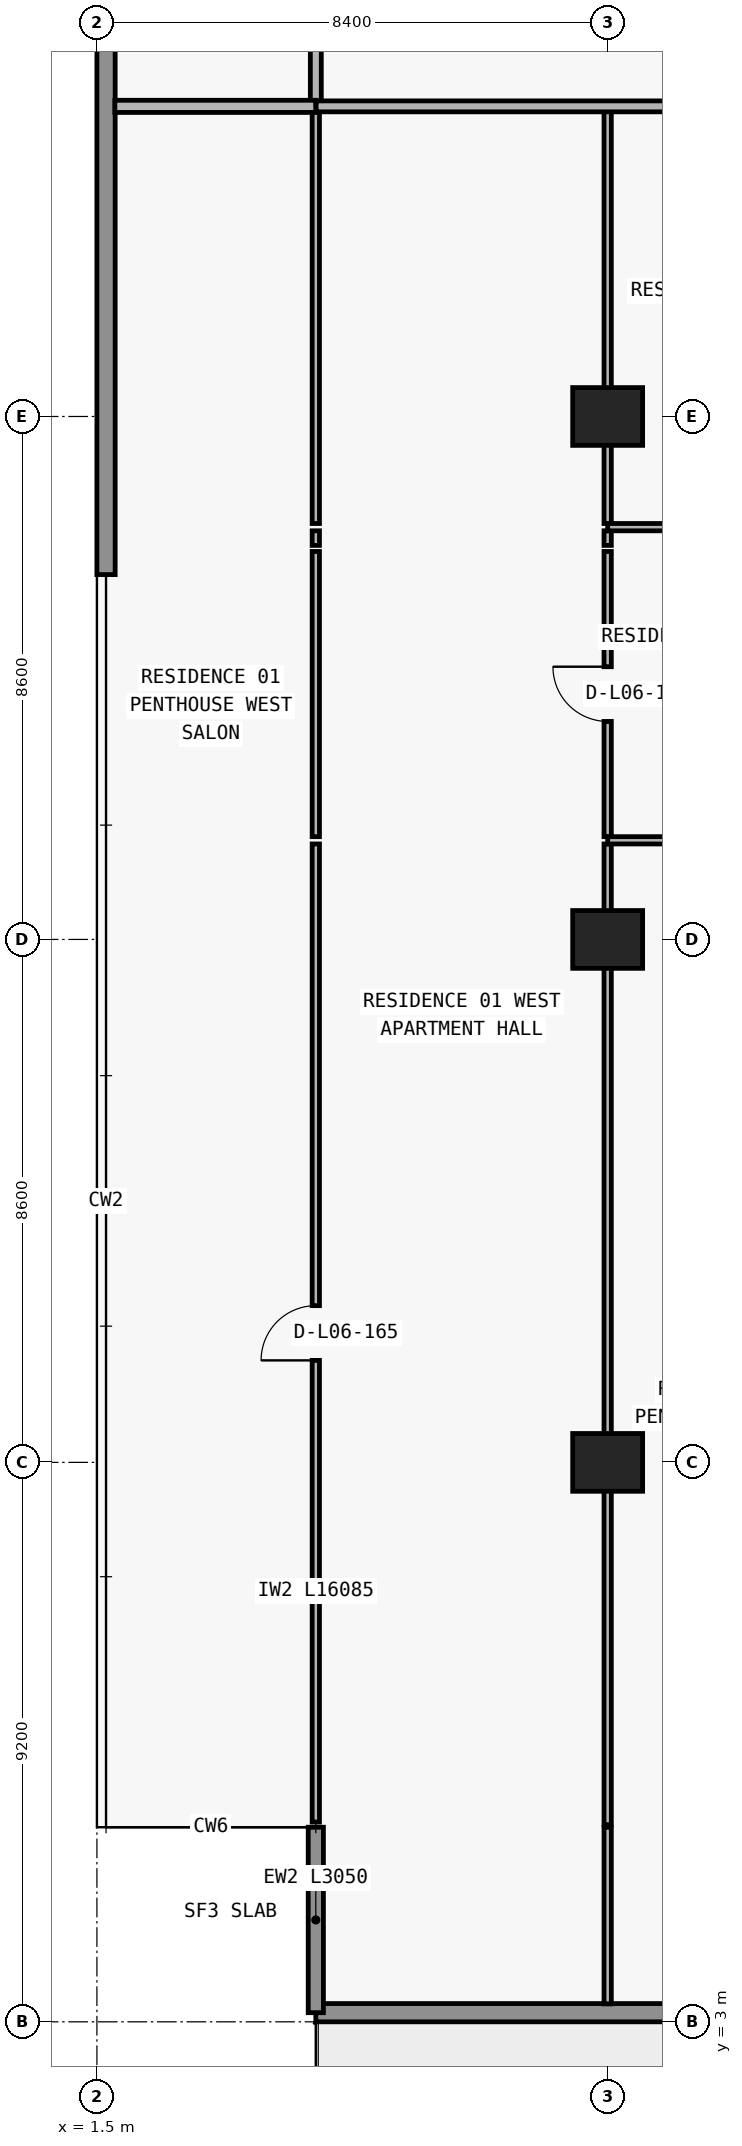
"""IFC4 building model, lengths in metres.
Left out: names, types, materials, properties, quantities, classifications, styles, units other than length and angle.
Written with IfcOpenShell. Run it as: python <this file> out.ifc"""

import sys

from ifc_helpers import new_model, si_unit, direction, frame, frame_2d, origin, origin_2d, place, context, subcontext, project, spatial, rectangle, extrude, element, fill, save


model = new_model("IFC4")
c1 = context("Model", 3, precision=1e-05, world=origin(), true_north=direction((0.0, 1.0)))
c2 = subcontext(c1, "Body", "Model", "MODEL_VIEW")
j1 = project(units=[si_unit("LENGTHUNIT", "METRE"), si_unit("PLANEANGLEUNIT", "RADIAN")], contexts=[c1])
p1 = place(None, origin())
s1 = spatial("IfcSite", under=j1, at=p1, CompositionType="ELEMENT")
p2 = place(p1, origin())
s2 = spatial("IfcBuilding", under=s1, at=p2, CompositionType="ELEMENT")
p3 = place(p2, frame((0.0, 0.0, 30.0)))
s3 = spatial("IfcBuildingStorey", under=s2, at=p3, CompositionType="ELEMENT", Elevation=30.0)
for number, where, z_axis, x_axis in (
    (1, (9.9, 12.2, 0.0), (0.0, 0.0, 1.0), (1.0, 0.0, 0.0)),
    (2, (9.9, 20.8, 0.0), (0.0, 0.0, 1.0), (1.0, 0.0, 0.0)),
    (3, (9.9, 29.4, 0.0), (0.0, 0.0, 1.0), (1.0, 0.0, 0.0)),
):
    element("IfcColumn", number, at=place(p3, frame(where, z_axis=z_axis, x_axis=x_axis)), inside=s3, PredefinedType="COLUMN", context=c2, shape_type="SweptSolid", body=[
        extrude(rectangle(XDim=1.15, YDim=0.95, at=origin_2d()), origin(), (0.0, 0.0, 1.0), 3.05),
    ])
p4 = place(p3, frame((72.7, 3.15, 0.0), z_axis=(0.0, 0.0, 1.0), x_axis=(-1.0, 0.0, 0.0)))
e4 = element("IfcWall", 4, at=p4, inside=s3, PredefinedType="STANDARD", context=c2, shape_type="SweptSolid", body=[
    extrude(rectangle(XDim=67.6, YDim=0.3, at=frame_2d((33.8, 0.0))), origin(), (0.0, 0.0, 1.0), 3.05),
])
p5 = place(p4, frame((59.826, 0.0, 0.0)))
e5 = element("IfcOpeningElement", 5, at=p5, cuts=e4, PredefinedType="OPENING", context=c2, shape_type="SweptSolid", body=[
    extrude(rectangle(XDim=2.0, YDim=2.3, at=frame_2d((1.0, 1.15))), frame((0.0, 0.16, 0.0), z_axis=(0.0, -1.0, 0.0), x_axis=(1.0, 0.0, 0.0)), (0.0, 0.0, 1.0), 0.32),
])
p6 = place(p4, frame((55.526, 0.0, 0.85)))
e6 = element("IfcOpeningElement", 6, at=p6, cuts=e4, PredefinedType="OPENING", context=c2, shape_type="SweptSolid", body=[
    extrude(rectangle(XDim=2.2, YDim=1.55, at=frame_2d((1.1, 0.775))), frame((0.0, 0.16, 0.0), z_axis=(0.0, -1.0, 0.0), x_axis=(1.0, 0.0, 0.0)), (0.0, 0.0, 1.0), 0.32),
])
p7 = place(p4, frame((51.09, 0.0, 0.0)))
e7 = element("IfcOpeningElement", 7, at=p7, cuts=e4, PredefinedType="OPENING", context=c2, shape_type="SweptSolid", body=[
    extrude(rectangle(XDim=2.0, YDim=2.3, at=frame_2d((1.0, 1.15))), frame((0.0, 0.16, 0.0), z_axis=(0.0, -1.0, 0.0), x_axis=(1.0, 0.0, 0.0)), (0.0, 0.0, 1.0), 0.32),
])
p8 = place(p4, frame((46.99, 0.0, 0.85)))
e8 = element("IfcOpeningElement", 8, at=p8, cuts=e4, PredefinedType="OPENING", context=c2, shape_type="SweptSolid", body=[
    extrude(rectangle(XDim=1.8, YDim=1.55, at=frame_2d((0.9, 0.775))), frame((0.0, 0.16, 0.0), z_axis=(0.0, -1.0, 0.0), x_axis=(1.0, 0.0, 0.0)), (0.0, 0.0, 1.0), 0.32),
])
p9 = place(p4, frame((43.026, 0.0, 0.0)))
e9 = element("IfcOpeningElement", 9, at=p9, cuts=e4, PredefinedType="OPENING", context=c2, shape_type="SweptSolid", body=[
    extrude(rectangle(XDim=2.0, YDim=2.3, at=frame_2d((1.0, 1.15))), frame((0.0, 0.16, 0.0), z_axis=(0.0, -1.0, 0.0), x_axis=(1.0, 0.0, 0.0)), (0.0, 0.0, 1.0), 0.32),
])
p10 = place(p4, frame((38.726, 0.0, 0.85)))
e10 = element("IfcOpeningElement", 10, at=p10, cuts=e4, PredefinedType="OPENING", context=c2, shape_type="SweptSolid", body=[
    extrude(rectangle(XDim=2.2, YDim=1.55, at=frame_2d((1.1, 0.775))), frame((0.0, 0.16, 0.0), z_axis=(0.0, -1.0, 0.0), x_axis=(1.0, 0.0, 0.0)), (0.0, 0.0, 1.0), 0.32),
])
p11 = place(p4, frame((34.69, 0.0, 0.0)))
e11 = element("IfcOpeningElement", 11, at=p11, cuts=e4, PredefinedType="OPENING", context=c2, shape_type="SweptSolid", body=[
    extrude(rectangle(XDim=2.0, YDim=2.3, at=frame_2d((1.0, 1.15))), frame((0.0, 0.16, 0.0), z_axis=(0.0, -1.0, 0.0), x_axis=(1.0, 0.0, 0.0)), (0.0, 0.0, 1.0), 0.32),
])
p12 = place(p4, frame((30.81, 0.0, 0.65)))
e12 = element("IfcOpeningElement", 12, at=p12, cuts=e4, PredefinedType="OPENING", context=c2, shape_type="SweptSolid", body=[
    extrude(rectangle(XDim=2.6, YDim=1.85, at=frame_2d((1.3, 0.925))), frame((0.0, 0.16, 0.0), z_axis=(0.0, -1.0, 0.0), x_axis=(1.0, 0.0, 0.0)), (0.0, 0.0, 1.0), 0.32),
])
p13 = place(p4, frame((24.7, 0.0, 0.85)))
e13 = element("IfcOpeningElement", 13, at=p13, cuts=e4, PredefinedType="OPENING", context=c2, shape_type="SweptSolid", body=[
    extrude(rectangle(XDim=2.2, YDim=1.55, at=frame_2d((1.1, 0.775))), frame((0.0, 0.16, 0.0), z_axis=(0.0, -1.0, 0.0), x_axis=(1.0, 0.0, 0.0)), (0.0, 0.0, 1.0), 0.32),
])
p14 = place(p4, frame((18.626, 0.0, 0.0)))
e14 = element("IfcOpeningElement", 14, at=p14, cuts=e4, PredefinedType="OPENING", context=c2, shape_type="SweptSolid", body=[
    extrude(rectangle(XDim=2.0, YDim=2.3, at=frame_2d((1.0, 1.15))), frame((0.0, 0.16, 0.0), z_axis=(0.0, -1.0, 0.0), x_axis=(1.0, 0.0, 0.0)), (0.0, 0.0, 1.0), 0.32),
])
p15 = place(p4, frame((14.326, 0.0, 0.85)))
e15 = element("IfcOpeningElement", 15, at=p15, cuts=e4, PredefinedType="OPENING", context=c2, shape_type="SweptSolid", body=[
    extrude(rectangle(XDim=2.2, YDim=1.55, at=frame_2d((1.1, 0.775))), frame((0.0, 0.16, 0.0), z_axis=(0.0, -1.0, 0.0), x_axis=(1.0, 0.0, 0.0)), (0.0, 0.0, 1.0), 0.32),
])
p16 = place(p4, frame((9.89, 0.0, 0.0)))
e16 = element("IfcOpeningElement", 16, at=p16, cuts=e4, PredefinedType="OPENING", context=c2, shape_type="SweptSolid", body=[
    extrude(rectangle(XDim=2.0, YDim=2.3, at=frame_2d((1.0, 1.15))), frame((0.0, 0.16, 0.0), z_axis=(0.0, -1.0, 0.0), x_axis=(1.0, 0.0, 0.0)), (0.0, 0.0, 1.0), 0.32),
])
p17 = place(p4, frame((5.79, 0.0, 0.85)))
e17 = element("IfcOpeningElement", 17, at=p17, cuts=e4, PredefinedType="OPENING", context=c2, shape_type="SweptSolid", body=[
    extrude(rectangle(XDim=1.8, YDim=1.55, at=frame_2d((0.9, 0.775))), frame((0.0, 0.16, 0.0), z_axis=(0.0, -1.0, 0.0), x_axis=(1.0, 0.0, 0.0)), (0.0, 0.0, 1.0), 0.32),
])
p18 = place(p3, frame((5.1, 6.2, 0.0), z_axis=(0.0, 0.0, 1.0), x_axis=(0.0, -1.0, 0.0)))
e18 = element("IfcWall", 18, at=p18, inside=s3, PredefinedType="ELEMENTEDWALL", context=c2, shape_type="SweptSolid", body=[
    extrude(rectangle(XDim=3.05, YDim=0.25, at=frame_2d((1.525, 0.0))), origin(), (0.0, 0.0, 1.0), 3.05),
])
p19 = place(p3, frame((1.65, 26.8, 0.0), z_axis=(0.0, 0.0, 1.0), x_axis=(0.0, 1.0, 0.0)))
e19 = element("IfcWall", 19, at=p19, inside=s3, PredefinedType="STANDARD", context=c2, shape_type="SweptSolid", body=[
    extrude(rectangle(XDim=20.6, YDim=0.3, at=frame_2d((10.3, 0.0))), origin(), (0.0, 0.0, 1.0), 3.05),
])
p20 = place(p3, frame((5.1, 6.285, 0.0), z_axis=(0.0, 0.0, 1.0), x_axis=(0.0, 1.0, 0.0)))
e20 = element("IfcWall", 20, at=p20, inside=s3, PredefinedType="PARTITIONING", context=c2, shape_type="SweptSolid", body=[
    extrude(rectangle(XDim=16.085, YDim=0.12, at=frame_2d((8.042, 0.0))), origin(), (0.0, 0.0, 1.0), 3.05),
])
p21 = place(p20, frame((7.593, 0.0, 0.0)))
e21 = element("IfcOpeningElement", 21, at=p21, cuts=e20, PredefinedType="OPENING", context=c2, shape_type="SweptSolid", body=[
    extrude(rectangle(XDim=0.9, YDim=2.15, at=frame_2d((0.45, 1.075))), frame((0.0, 0.07, 0.0), z_axis=(0.0, -1.0, 0.0), x_axis=(1.0, 0.0, 0.0)), (0.0, 0.0, 1.0), 0.14),
])
p22 = place(p3, frame((5.1, 22.49, 0.0), z_axis=(0.0, 0.0, 1.0), x_axis=(0.0, 1.0, 0.0)))
e22 = element("IfcWall", 22, at=p22, inside=s3, PredefinedType="PARTITIONING", context=c2, shape_type="SweptSolid", body=[
    extrude(rectangle(XDim=4.69, YDim=0.12, at=frame_2d((2.345, 0.0))), origin(), (0.0, 0.0, 1.0), 3.05),
])
p23 = place(p3, frame((5.1, 27.28, 0.0), z_axis=(0.0, 0.0, 1.0), x_axis=(0.0, 1.0, 0.0)))
e23 = element("IfcWall", 23, at=p23, inside=s3, PredefinedType="PARTITIONING", context=c2, shape_type="SweptSolid", body=[
    extrude(rectangle(XDim=0.24, YDim=0.12, at=frame_2d((0.12, 0.0))), origin(), (0.0, 0.0, 1.0), 3.05),
])
p24 = place(p3, frame((5.1, 27.64, 0.0), z_axis=(0.0, 0.0, 1.0), x_axis=(0.0, 1.0, 0.0)))
e24 = element("IfcWall", 24, at=p24, inside=s3, PredefinedType="PARTITIONING", context=c2, shape_type="SweptSolid", body=[
    extrude(rectangle(XDim=6.86, YDim=0.12, at=frame_2d((3.43, 0.0))), origin(), (0.0, 0.0, 1.0), 3.05),
])
p25 = place(p3, frame((5.1, 34.505, 0.0), z_axis=(0.0, 0.0, 1.0), x_axis=(0.0, 1.0, 0.0)))
e25 = element("IfcWall", 25, at=p25, inside=s3, PredefinedType="PARTITIONING", context=c2, shape_type="SweptSolid", body=[
    extrude(rectangle(XDim=2.395, YDim=0.18, at=frame_2d((1.198, 0.0))), origin(), (0.0, 0.0, 1.0), 3.05),
])
p26 = place(p3, frame((9.9, 3.295, 0.0), z_axis=(0.0, 0.0, 1.0), x_axis=(0.0, 1.0, 0.0)))
e26 = element("IfcWall", 26, at=p26, inside=s3, PredefinedType="PARTITIONING", context=c2, shape_type="SweptSolid", body=[
    extrude(rectangle(XDim=2.905, YDim=0.12, at=frame_2d((1.453, 0.0))), origin(), (0.0, 0.0, 1.0), 3.05),
])
p27 = place(p3, frame((9.9, 6.24, 0.0), z_axis=(0.0, 0.0, 1.0), x_axis=(0.0, 1.0, 0.0)))
e27 = element("IfcWall", 27, at=p27, inside=s3, PredefinedType="PARTITIONING", context=c2, shape_type="SweptSolid", body=[
    extrude(rectangle(XDim=16.13, YDim=0.12, at=frame_2d((8.065, 0.0))), origin(), (0.0, 0.0, 1.0), 2.11),
])
p28 = place(p3, frame((9.9, 22.49, 0.0), z_axis=(0.0, 0.0, 1.0), x_axis=(0.0, 1.0, 0.0)))
e28 = element("IfcWall", 28, at=p28, inside=s3, PredefinedType="PARTITIONING", context=c2, shape_type="SweptSolid", body=[
    extrude(rectangle(XDim=4.69, YDim=0.12, at=frame_2d((2.345, 0.0))), origin(), (0.0, 0.0, 1.0), 2.11),
])
p29 = place(p28, frame((1.895, 0.0, 0.0)))
e29 = element("IfcOpeningElement", 29, at=p29, cuts=e28, PredefinedType="OPENING", context=c2, shape_type="SweptSolid", body=[
    extrude(rectangle(XDim=0.9, YDim=2.06, at=frame_2d((0.45, 1.03))), frame((0.0, 0.07, 0.0), z_axis=(0.0, -1.0, 0.0), x_axis=(1.0, 0.0, 0.0)), (0.0, 0.0, 1.0), 0.14),
])
p30 = place(p3, frame((9.9, 27.28, 0.0), z_axis=(0.0, 0.0, 1.0), x_axis=(0.0, 1.0, 0.0)))
e30 = element("IfcWall", 30, at=p30, inside=s3, PredefinedType="PARTITIONING", context=c2, shape_type="SweptSolid", body=[
    extrude(rectangle(XDim=0.24, YDim=0.12, at=frame_2d((0.12, 0.0))), origin(), (0.0, 0.0, 1.0), 2.11),
])
p31 = place(p3, frame((9.9, 27.64, 0.0), z_axis=(0.0, 0.0, 1.0), x_axis=(0.0, 1.0, 0.0)))
e31 = element("IfcWall", 31, at=p31, inside=s3, PredefinedType="PARTITIONING", context=c2, shape_type="SweptSolid", body=[
    extrude(rectangle(XDim=6.86, YDim=0.12, at=frame_2d((3.43, 0.0))), origin(), (0.0, 0.0, 1.0), 2.11),
])
p32 = place(p3, frame((9.9, 22.43, 0.0), z_axis=(0.0, 0.0, 1.0), x_axis=(1.0, 0.0, 0.0)))
e32 = element("IfcWall", 32, at=p32, inside=s3, PredefinedType="PARTITIONING", context=c2, shape_type="SweptSolid", body=[
    extrude(rectangle(XDim=8.4, YDim=0.12, at=frame_2d((4.2, 0.0))), origin(), (0.0, 0.0, 1.0), 3.05),
])
p33 = place(p32, frame((1.524, 0.0, 0.0)))
e33 = element("IfcOpeningElement", 33, at=p33, cuts=e32, PredefinedType="OPENING", context=c2, shape_type="SweptSolid", body=[
    extrude(rectangle(XDim=0.9, YDim=2.15, at=frame_2d((0.45, 1.075))), frame((0.0, 0.07, 0.0), z_axis=(0.0, -1.0, 0.0), x_axis=(1.0, 0.0, 0.0)), (0.0, 0.0, 1.0), 0.14),
])
p34 = place(p32, frame((6.018, 0.0, 0.0)))
e34 = element("IfcOpeningElement", 34, at=p34, cuts=e32, PredefinedType="OPENING", context=c2, shape_type="SweptSolid", body=[
    extrude(rectangle(XDim=0.9, YDim=2.15, at=frame_2d((0.45, 1.075))), frame((0.0, 0.07, 0.0), z_axis=(0.0, -1.0, 0.0), x_axis=(1.0, 0.0, 0.0)), (0.0, 0.0, 1.0), 0.14),
])
p35 = place(p3, frame((9.9, 27.58, 0.0), z_axis=(0.0, 0.0, 1.0), x_axis=(1.0, 0.0, 0.0)))
e35 = element("IfcWall", 35, at=p35, inside=s3, PredefinedType="PARTITIONING", context=c2, shape_type="SweptSolid", body=[
    extrude(rectangle(XDim=8.4, YDim=0.12, at=frame_2d((4.2, 0.0))), origin(), (0.0, 0.0, 1.0), 3.05),
])
p36 = place(p35, frame((1.818, 0.0, 0.0)))
e36 = element("IfcOpeningElement", 36, at=p36, cuts=e35, PredefinedType="OPENING", context=c2, shape_type="SweptSolid", body=[
    extrude(rectangle(XDim=0.9, YDim=2.15, at=frame_2d((0.45, 1.075))), frame((0.0, 0.07, 0.0), z_axis=(0.0, -1.0, 0.0), x_axis=(1.0, 0.0, 0.0)), (0.0, 0.0, 1.0), 0.14),
])
p37 = place(p3, frame((1.795, 34.5, 0.0), z_axis=(0.0, 0.0, 1.0), x_axis=(1.0, 0.0, 0.0)))
e37 = element("IfcWall", 37, at=p37, inside=s3, PredefinedType="PARTITIONING", context=c2, shape_type="SweptSolid", body=[
    extrude(rectangle(XDim=3.305, YDim=0.2, at=frame_2d((1.653, 0.0))), origin(), (0.0, 0.0, 1.0), 3.05),
])
p38 = place(p3, frame((5.105, 34.5, 0.0), z_axis=(0.0, 0.0, 1.0), x_axis=(1.0, 0.0, 0.0)))
e38 = element("IfcWall", 38, at=p38, inside=s3, PredefinedType="PARTITIONING", context=c2, shape_type="SweptSolid", body=[
    extrude(rectangle(XDim=50.781, YDim=0.18, at=frame_2d((25.391, 0.0))), origin(), (0.0, 0.0, 1.0), 3.05),
])
p39 = place(p38, frame((7.67, 0.0, 0.0)))
e39 = element("IfcOpeningElement", 39, at=p39, cuts=e38, PredefinedType="OPENING", context=c2, shape_type="SweptSolid", body=[
    extrude(rectangle(XDim=1.0, YDim=2.2, at=frame_2d((0.5, 1.1))), frame((0.0, 0.1, 0.0), z_axis=(0.0, -1.0, 0.0), x_axis=(1.0, 0.0, 0.0)), (0.0, 0.0, 1.0), 0.2),
])
p40 = place(p38, frame((16.07, 0.0, 0.0)))
e40 = element("IfcOpeningElement", 40, at=p40, cuts=e38, PredefinedType="OPENING", context=c2, shape_type="SweptSolid", body=[
    extrude(rectangle(XDim=1.0, YDim=2.2, at=frame_2d((0.5, 1.1))), frame((0.0, 0.1, 0.0), z_axis=(0.0, -1.0, 0.0), x_axis=(1.0, 0.0, 0.0)), (0.0, 0.0, 1.0), 0.2),
])
p41 = place(p38, frame((24.47, 0.0, 0.0)))
e41 = element("IfcOpeningElement", 41, at=p41, cuts=e38, PredefinedType="OPENING", context=c2, shape_type="SweptSolid", body=[
    extrude(rectangle(XDim=1.0, YDim=2.2, at=frame_2d((0.5, 1.1))), frame((0.0, 0.1, 0.0), z_axis=(0.0, -1.0, 0.0), x_axis=(1.0, 0.0, 0.0)), (0.0, 0.0, 1.0), 0.2),
])
p42 = place(p38, frame((32.545, 0.0, 0.0)))
e42 = element("IfcOpeningElement", 42, at=p42, cuts=e38, PredefinedType="OPENING", context=c2, shape_type="SweptSolid", body=[
    extrude(rectangle(XDim=1.0, YDim=2.2, at=frame_2d((0.5, 1.1))), frame((0.0, 0.1, 0.0), z_axis=(0.0, -1.0, 0.0), x_axis=(1.0, 0.0, 0.0)), (0.0, 0.0, 1.0), 0.2),
])
p43 = place(p38, frame((47.888, 0.0, 0.0)))
e43 = element("IfcOpeningElement", 43, at=p43, cuts=e38, PredefinedType="OPENING", context=c2, shape_type="SweptSolid", body=[
    extrude(rectangle(XDim=1.0, YDim=2.2, at=frame_2d((0.5, 1.1))), frame((0.0, 0.1, 0.0), z_axis=(0.0, -1.0, 0.0), x_axis=(1.0, 0.0, 0.0)), (0.0, 0.0, 1.0), 0.2),
])
p44 = place(p29, origin())
e44 = element("IfcDoor", 44, at=p44, inside=s3, OperationType="SINGLE_SWING_RIGHT", PredefinedType="DOOR", context=c2, shape_type="SweptSolid", body=[
    extrude(rectangle(XDim=0.9, YDim=2.06, at=frame_2d((0.45, 1.03))), frame((0.0, 0.025, 0.0), z_axis=(0.0, -1.0, 0.0), x_axis=(1.0, 0.0, 0.0)), (0.0, 0.0, 1.0), 0.05),
])
fill(e29, e44)
p45 = place(p21, origin())
e45 = element("IfcDoor", 45, at=p45, inside=s3, OperationType="SINGLE_SWING_LEFT", PredefinedType="DOOR", context=c2, shape_type="SweptSolid", body=[
    extrude(rectangle(XDim=0.9, YDim=2.15, at=frame_2d((0.45, 1.075))), frame((0.0, 0.025, 0.0), z_axis=(0.0, -1.0, 0.0), x_axis=(1.0, 0.0, 0.0)), (0.0, 0.0, 1.0), 0.05),
])
fill(e21, e45)
save(model, sys.argv[1])
